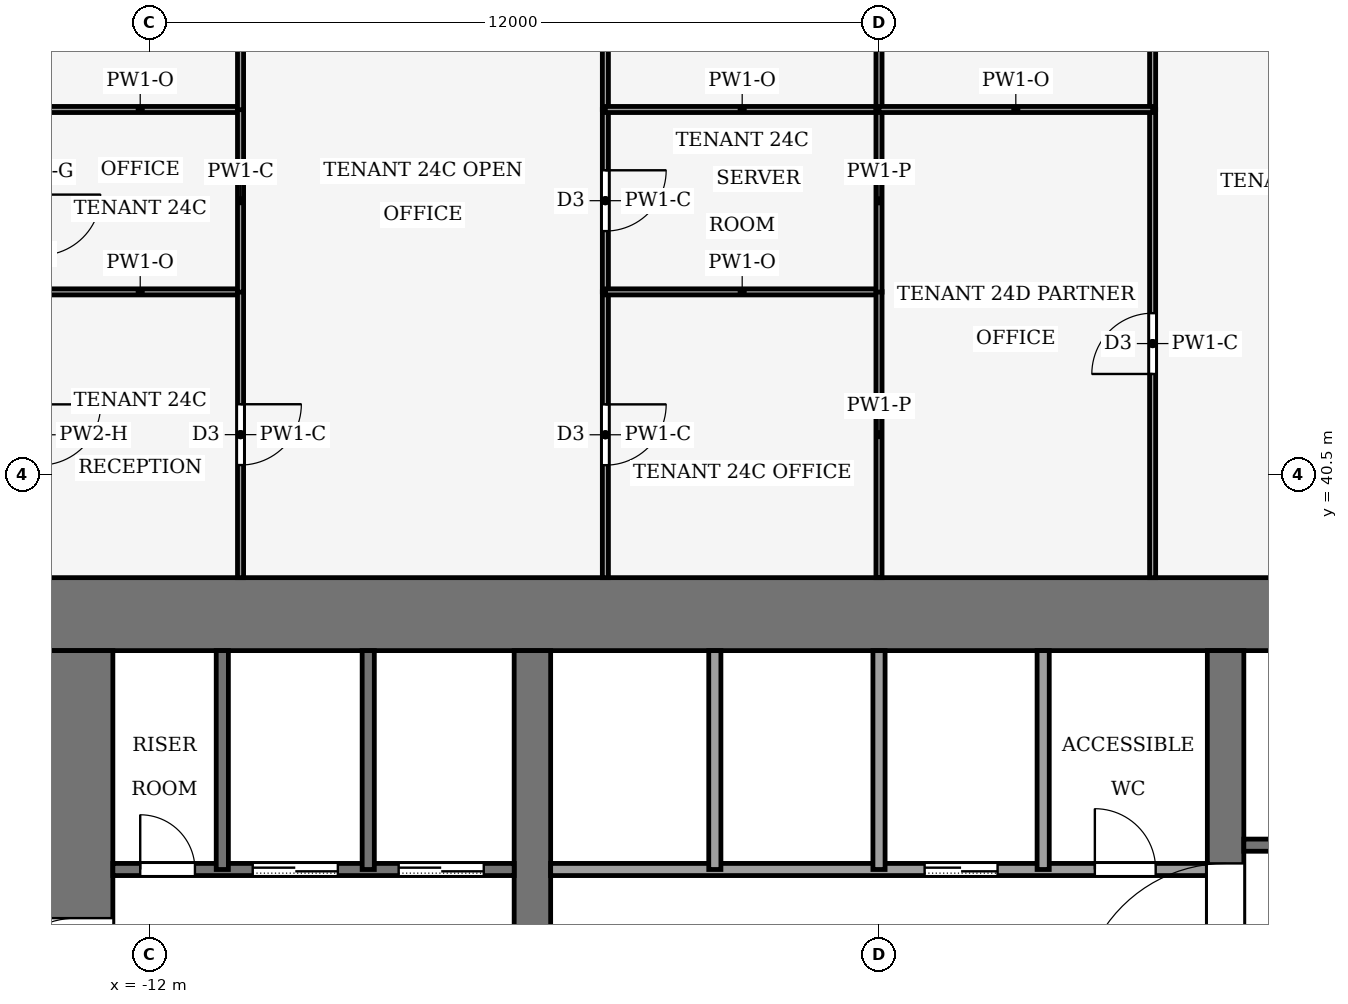
"""IFC4 building model, lengths in metres.
Left out: names, types, materials, properties, quantities, classifications, styles, units other than length and angle.
Written with IfcOpenShell. Run it as: python <this file> out.ifc"""

import sys

from ifc_helpers import new_model, si_unit, direction, frame, frame_2d, origin, place, context, subcontext, project, spatial, rectangle, extrude, element, fill, save


model = new_model("IFC4")
c1 = context("Model", 3, precision=1e-05, world=origin(), true_north=direction((0.0, 1.0)))
c2 = subcontext(c1, "Body", "Model", "MODEL_VIEW")
j1 = project(units=[si_unit("LENGTHUNIT", "METRE"), si_unit("PLANEANGLEUNIT", "RADIAN")], contexts=[c1])
p1 = place(None, origin())
s1 = spatial("IfcSite", under=j1, at=p1, CompositionType="ELEMENT")
p2 = place(p1, origin())
s2 = spatial("IfcBuilding", under=s1, at=p2, CompositionType="ELEMENT")
p3 = place(p2, frame((0.0, 0.0, 106.0)))
s3 = spatial("IfcBuildingStorey", under=s2, at=p3, CompositionType="ELEMENT", Elevation=106.0)
p4 = place(p3, frame((-13.8, 38.2, -0.13), z_axis=(0.0, 0.0, 1.0), x_axis=(1.0, 0.0, 0.0)))
e1 = element("IfcWall", 1, at=p4, inside=s3, PredefinedType="SHEAR", context=c2, shape_type="SweptSolid", body=[
    extrude(rectangle(XDim=27.6, YDim=1.2, at=frame_2d((13.8, 0.0))), origin(), (0.0, 0.0, 1.0), 4.0),
])
p5 = place(p3, frame((-13.2, 18.4, -0.13), z_axis=(0.0, 0.0, 1.0), x_axis=(0.0, 1.0, 0.0)))
e2 = element("IfcWall", 2, at=p5, inside=s3, PredefinedType="SHEAR", context=c2, shape_type="SweptSolid", body=[
    extrude(rectangle(XDim=19.2, YDim=1.2, at=frame_2d((9.6, 0.0))), origin(), (0.0, 0.0, 1.0), 4.0),
])
p6 = place(p5, frame((2.8, 0.0, 0.13)))
e3 = element("IfcOpeningElement", 3, at=p6, cuts=e2, PredefinedType="OPENING", context=c2, shape_type="SweptSolid", body=[
    extrude(rectangle(XDim=2.4, YDim=2.4, at=frame_2d((1.2, 1.2))), frame((0.0, 0.61, 0.0), z_axis=(0.0, -1.0, 0.0), x_axis=(1.0, 0.0, 0.0)), (0.0, 0.0, 1.0), 1.22),
])
p7 = place(p5, frame((13.4, 0.0, 0.13)))
e4 = element("IfcOpeningElement", 4, at=p7, cuts=e2, PredefinedType="OPENING", context=c2, shape_type="SweptSolid", body=[
    extrude(rectangle(XDim=1.4, YDim=2.2, at=frame_2d((0.7, 1.1))), frame((0.0, 0.61, 0.0), z_axis=(0.0, -1.0, 0.0), x_axis=(1.0, 0.0, 0.0)), (0.0, 0.0, 1.0), 1.22),
])
p8 = place(p3, frame((-5.7, 18.4, -0.13), z_axis=(0.0, 0.0, 1.0), x_axis=(0.0, 1.0, 0.0)))
e5 = element("IfcWall", 5, at=p8, inside=s3, PredefinedType="SHEAR", context=c2, shape_type="SweptSolid", body=[
    extrude(rectangle(XDim=19.2, YDim=0.6, at=frame_2d((9.6, 0.0))), origin(), (0.0, 0.0, 1.0), 4.0),
])
p9 = place(p8, frame((8.35, 0.0, 0.13)))
e6 = element("IfcOpeningElement", 6, at=p9, cuts=e5, PredefinedType="OPENING", context=c2, shape_type="SweptSolid", body=[
    extrude(rectangle(XDim=0.9, YDim=2.1, at=frame_2d((0.45, 1.05))), frame((0.0, 0.31, 0.0), z_axis=(0.0, -1.0, 0.0), x_axis=(1.0, 0.0, 0.0)), (0.0, 0.0, 1.0), 0.62),
])
p10 = place(p3, frame((5.7, 18.4, -0.13), z_axis=(0.0, 0.0, 1.0), x_axis=(0.0, 1.0, 0.0)))
e7 = element("IfcWall", 7, at=p10, inside=s3, PredefinedType="SHEAR", context=c2, shape_type="SweptSolid", body=[
    extrude(rectangle(XDim=19.2, YDim=0.6, at=frame_2d((9.6, 0.0))), origin(), (0.0, 0.0, 1.0), 4.0),
])
p11 = place(p10, frame((8.35, 0.0, 0.13)))
e8 = element("IfcOpeningElement", 8, at=p11, cuts=e7, PredefinedType="OPENING", context=c2, shape_type="SweptSolid", body=[
    extrude(rectangle(XDim=0.9, YDim=2.1, at=frame_2d((0.45, 1.05))), frame((0.0, 0.31, 0.0), z_axis=(0.0, -1.0, 0.0), x_axis=(1.0, 0.0, 0.0)), (0.0, 0.0, 1.0), 0.62),
])
p12 = place(p10, frame((13.3, 0.0, 0.13)))
e9 = element("IfcOpeningElement", 9, at=p12, cuts=e7, PredefinedType="OPENING", context=c2, shape_type="SweptSolid", body=[
    extrude(rectangle(XDim=2.4, YDim=2.4, at=frame_2d((1.2, 1.2))), frame((0.0, 0.31, 0.0), z_axis=(0.0, -1.0, 0.0), x_axis=(1.0, 0.0, 0.0)), (0.0, 0.0, 1.0), 0.62),
])
p13 = place(p3, frame((-12.6, 34.0, 0.0), z_axis=(0.0, 0.0, 1.0), x_axis=(1.0, 0.0, 0.0)))
e10 = element("IfcWall", 10, at=p13, inside=s3, PredefinedType="PARTITIONING", context=c2, shape_type="SweptSolid", body=[
    extrude(rectangle(XDim=6.6, YDim=0.2, at=frame_2d((3.3, 0.0))), origin(), (0.0, 0.0, 1.0), 3.87),
])
p14 = place(p13, frame((4.7, 0.0, 0.0)))
e11 = element("IfcOpeningElement", 11, at=p14, cuts=e10, PredefinedType="OPENING", context=c2, shape_type="SweptSolid", body=[
    extrude(rectangle(XDim=1.4, YDim=2.2, at=frame_2d((0.7, 1.1))), frame((0.0, 0.11, 0.0), z_axis=(0.0, -1.0, 0.0), x_axis=(1.0, 0.0, 0.0)), (0.0, 0.0, 1.0), 0.22),
])
p15 = place(p13, frame((2.3, 0.0, 0.0)))
e12 = element("IfcOpeningElement", 12, at=p15, cuts=e10, PredefinedType="OPENING", context=c2, shape_type="SweptSolid", body=[
    extrude(rectangle(XDim=1.4, YDim=2.2, at=frame_2d((0.7, 1.1))), frame((0.0, 0.11, 0.0), z_axis=(0.0, -1.0, 0.0), x_axis=(1.0, 0.0, 0.0)), (0.0, 0.0, 1.0), 0.22),
])
p16 = place(p13, frame((0.45, 0.0, 0.0)))
e13 = element("IfcOpeningElement", 13, at=p16, cuts=e10, PredefinedType="OPENING", context=c2, shape_type="SweptSolid", body=[
    extrude(rectangle(XDim=0.9, YDim=2.1, at=frame_2d((0.45, 1.05))), frame((0.0, 0.11, 0.0), z_axis=(0.0, -1.0, 0.0), x_axis=(1.0, 0.0, 0.0)), (0.0, 0.0, 1.0), 0.22),
])
p17 = place(p3, frame((-5.4, 34.0, 0.0), z_axis=(0.0, 0.0, 1.0), x_axis=(1.0, 0.0, 0.0)))
e14 = element("IfcWall", 14, at=p17, inside=s3, PredefinedType="PARTITIONING", context=c2, shape_type="SweptSolid", body=[
    extrude(rectangle(XDim=10.8, YDim=0.2, at=frame_2d((5.4, 0.0))), origin(), (0.0, 0.0, 1.0), 3.87),
])
p18 = place(p17, frame((6.15, 0.0, 0.0)))
e15 = element("IfcOpeningElement", 15, at=p18, cuts=e14, PredefinedType="OPENING", context=c2, shape_type="SweptSolid", body=[
    extrude(rectangle(XDim=1.2, YDim=2.2, at=frame_2d((0.6, 1.1))), frame((0.0, 0.11, 0.0), z_axis=(0.0, -1.0, 0.0), x_axis=(1.0, 0.0, 0.0)), (0.0, 0.0, 1.0), 0.22),
])
p19 = place(p17, frame((8.95, 0.0, 0.0)))
e16 = element("IfcOpeningElement", 16, at=p19, cuts=e14, PredefinedType="OPENING", context=c2, shape_type="SweptSolid", body=[
    extrude(rectangle(XDim=1.0, YDim=2.1, at=frame_2d((0.5, 1.05))), frame((0.0, 0.11, 0.0), z_axis=(0.0, -1.0, 0.0), x_axis=(1.0, 0.0, 0.0)), (0.0, 0.0, 1.0), 0.22),
])
p20 = place(p3, frame((6.0, 34.4, 0.0), z_axis=(0.0, 0.0, 1.0), x_axis=(1.0, 0.0, 0.0)))
e17 = element("IfcWall", 17, at=p20, inside=s3, PredefinedType="PARTITIONING", context=c2, shape_type="SweptSolid", body=[
    extrude(rectangle(XDim=6.6, YDim=0.2, at=frame_2d((3.3, 0.0))), origin(), (0.0, 0.0, 1.0), 3.87),
])
p21 = place(p20, frame((4.8, 0.0, 0.0)))
e18 = element("IfcOpeningElement", 18, at=p21, cuts=e17, PredefinedType="OPENING", context=c2, shape_type="SweptSolid", body=[
    extrude(rectangle(XDim=1.2, YDim=2.2, at=frame_2d((0.6, 1.1))), frame((0.0, 0.11, 0.0), z_axis=(0.0, -1.0, 0.0), x_axis=(1.0, 0.0, 0.0)), (0.0, 0.0, 1.0), 0.22),
])
for number, where, z_axis, x_axis in (
    (19, (-10.8, 34.0, 0.0), (0.0, 0.0, 1.0), (0.0, 1.0, 0.0)),
    (20, (-8.4, 34.0, 0.0), (0.0, 0.0, 1.0), (0.0, 1.0, 0.0)),
    (21, (-2.7, 34.0, 0.0), (0.0, 0.0, 1.0), (0.0, 1.0, 0.0)),
    (22, (0.0, 34.0, 0.0), (0.0, 0.0, 1.0), (0.0, 1.0, 0.0)),
    (23, (2.7, 34.0, 0.0), (0.0, 0.0, 1.0), (0.0, 1.0, 0.0)),
):
    element("IfcWall", number, at=place(p3, frame(where, z_axis=z_axis, x_axis=x_axis)), inside=s3, PredefinedType="PARTITIONING", context=c2, shape_type="SweptSolid", body=[
        extrude(rectangle(XDim=3.6, YDim=0.2, at=frame_2d((1.8, 0.0))), origin(), (0.0, 0.0, 1.0), 3.87),
    ])
p22 = place(p3, frame((-10.5, 43.5, 0.0), z_axis=(0.0, 0.0, 1.0), x_axis=(-1.0, 0.0, 0.0)))
e24 = element("IfcWall", 24, at=p22, inside=s3, PredefinedType="PARTITIONING", context=c2, shape_type="SweptSolid", body=[
    extrude(rectangle(XDim=3.3, YDim=0.1, at=frame_2d((1.65, 0.0))), origin(), (0.0, 0.0, 1.0), 3.39),
])
p23 = place(p3, frame((-10.5, 43.504, 0.0), z_axis=(0.0, 0.0, 1.0), x_axis=(0.0, -1.0, 0.0)))
e25 = element("IfcWall", 25, at=p23, inside=s3, PredefinedType="PARTITIONING", context=c2, shape_type="SweptSolid", body=[
    extrude(rectangle(XDim=4.704, YDim=0.1, at=frame_2d((2.352, 0.0))), origin(), (0.0, 0.0, 1.0), 3.87),
])
p24 = place(p23, frame((1.852, 0.0, 0.0)))
e26 = element("IfcOpeningElement", 26, at=p24, cuts=e25, PredefinedType="OPENING", context=c2, shape_type="SweptSolid", body=[
    extrude(rectangle(XDim=1.0, YDim=2.1, at=frame_2d((0.5, 1.05))), frame((0.0, 0.06, 0.0), z_axis=(0.0, -1.0, 0.0), x_axis=(1.0, 0.0, 0.0)), (0.0, 0.0, 1.0), 0.12),
])
p25 = place(p3, frame((-10.5, 46.5, 0.0), z_axis=(0.0, 0.0, 1.0), x_axis=(-1.0, 0.0, 0.0)))
e27 = element("IfcWall", 27, at=p25, inside=s3, PredefinedType="PARTITIONING", context=c2, shape_type="SweptSolid", body=[
    extrude(rectangle(XDim=3.3, YDim=0.1, at=frame_2d((1.65, 0.0))), origin(), (0.0, 0.0, 1.0), 3.39),
])
for number, where, z_axis, x_axis in (
    (28, (-10.5, 43.496, 0.0), (0.0, 0.0, 1.0), (0.0, 1.0, 0.0)),
    (29, (-10.5, 46.496, 0.0), (0.0, 0.0, 1.0), (0.0, 1.0, 0.0)),
):
    element("IfcWall", number, at=place(p3, frame(where, z_axis=z_axis, x_axis=x_axis)), inside=s3, PredefinedType="PARTITIONING", context=c2, shape_type="SweptSolid", body=[
        extrude(rectangle(XDim=3.008, YDim=0.1, at=frame_2d((1.504, 0.0))), origin(), (0.0, 0.0, 1.0), 3.87),
    ])
p26 = place(p3, frame((-4.5, 43.5, 0.0), z_axis=(0.0, 0.0, 1.0), x_axis=(0.0, -1.0, 0.0)))
e30 = element("IfcWall", 30, at=p26, inside=s3, PredefinedType="PARTITIONING", context=c2, shape_type="SweptSolid", body=[
    extrude(rectangle(XDim=4.7, YDim=0.1, at=frame_2d((2.35, 0.0))), origin(), (0.0, 0.0, 1.0), 3.87),
])
p27 = place(p26, frame((1.85, 0.0, 0.0)))
e31 = element("IfcOpeningElement", 31, at=p27, cuts=e30, PredefinedType="OPENING", context=c2, shape_type="SweptSolid", body=[
    extrude(rectangle(XDim=1.0, YDim=2.1, at=frame_2d((0.5, 1.05))), frame((0.0, 0.06, 0.0), z_axis=(0.0, -1.0, 0.0), x_axis=(1.0, 0.0, 0.0)), (0.0, 0.0, 1.0), 0.12),
])
p28 = place(p3, frame((-4.5, 46.5, 0.0), z_axis=(0.0, 0.0, 1.0), x_axis=(0.0, -1.0, 0.0)))
e32 = element("IfcWall", 32, at=p28, inside=s3, PredefinedType="PARTITIONING", context=c2, shape_type="SweptSolid", body=[
    extrude(rectangle(XDim=3.0, YDim=0.1, at=frame_2d((1.5, 0.0))), origin(), (0.0, 0.0, 1.0), 3.87),
])
p29 = place(p28, frame((1.0, 0.0, 0.0)))
e33 = element("IfcOpeningElement", 33, at=p29, cuts=e32, PredefinedType="OPENING", context=c2, shape_type="SweptSolid", body=[
    extrude(rectangle(XDim=1.0, YDim=2.1, at=frame_2d((0.5, 1.05))), frame((0.0, 0.06, 0.0), z_axis=(0.0, -1.0, 0.0), x_axis=(1.0, 0.0, 0.0)), (0.0, 0.0, 1.0), 0.12),
])
p30 = place(p3, frame((-4.5, 51.955, 0.0), z_axis=(0.0, 0.0, 1.0), x_axis=(0.0, -1.0, 0.0)))
e34 = element("IfcWall", 34, at=p30, inside=s3, PredefinedType="PARTITIONING", context=c2, shape_type="SweptSolid", body=[
    extrude(rectangle(XDim=5.455, YDim=0.1, at=frame_2d((2.728, 0.0))), origin(), (0.0, 0.0, 1.0), 3.04),
])
p31 = place(p30, frame((2.292, 0.0, 0.0)))
e35 = element("IfcOpeningElement", 35, at=p31, cuts=e34, PredefinedType="OPENING", context=c2, shape_type="SweptSolid", body=[
    extrude(rectangle(XDim=1.0, YDim=2.1, at=frame_2d((0.5, 1.05))), frame((0.0, 0.06, 0.0), z_axis=(0.0, -1.0, 0.0), x_axis=(1.0, 0.0, 0.0)), (0.0, 0.0, 1.0), 0.12),
])
p32 = place(p3, frame((0.0, 43.5, 0.0), z_axis=(0.0, 0.0, 1.0), x_axis=(-1.0, 0.0, 0.0)))
e36 = element("IfcWall", 36, at=p32, inside=s3, PredefinedType="PARTITIONING", context=c2, shape_type="SweptSolid", body=[
    extrude(rectangle(XDim=4.5, YDim=0.1, at=frame_2d((2.25, 0.0))), origin(), (0.0, 0.0, 1.0), 3.39),
])
p33 = place(p3, frame((0.0, 38.8, 0.0), z_axis=(0.0, 0.0, 1.0), x_axis=(0.0, 1.0, 0.0)))
e37 = element("IfcWall", 37, at=p33, inside=s3, PredefinedType="PARTITIONING", context=c2, shape_type="SweptSolid", body=[
    extrude(rectangle(XDim=4.704, YDim=0.1, at=frame_2d((2.352, 0.0))), origin(), (0.0, 0.0, 1.0), 3.44),
])
p34 = place(p3, frame((0.0, 46.5, 0.0), z_axis=(0.0, 0.0, 1.0), x_axis=(-1.0, 0.0, 0.0)))
e38 = element("IfcWall", 38, at=p34, inside=s3, PredefinedType="PARTITIONING", context=c2, shape_type="SweptSolid", body=[
    extrude(rectangle(XDim=4.5, YDim=0.1, at=frame_2d((2.25, 0.0))), origin(), (0.0, 0.0, 1.0), 3.39),
])
p35 = place(p3, frame((0.0, 43.496, 0.0), z_axis=(0.0, 0.0, 1.0), x_axis=(0.0, 1.0, 0.0)))
e39 = element("IfcWall", 39, at=p35, inside=s3, PredefinedType="PARTITIONING", context=c2, shape_type="SweptSolid", body=[
    extrude(rectangle(XDim=3.004, YDim=0.1, at=frame_2d((1.502, 0.0))), origin(), (0.0, 0.0, 1.0), 3.44),
])
p36 = place(p3, frame((0.0, 46.5, 0.0), z_axis=(0.0, 0.0, 1.0), x_axis=(0.0, 1.0, 0.0)))
e40 = element("IfcWall", 40, at=p36, inside=s3, PredefinedType="PARTITIONING", context=c2, shape_type="SweptSolid", body=[
    extrude(rectangle(XDim=5.08, YDim=0.1, at=frame_2d((2.54, 0.0))), origin(), (0.0, 0.0, 1.0), 3.04),
])
p37 = place(p3, frame((4.5, 38.8, 0.0), z_axis=(0.0, 0.0, 1.0), x_axis=(0.0, 1.0, 0.0)))
e41 = element("IfcWall", 41, at=p37, inside=s3, PredefinedType="PARTITIONING", context=c2, shape_type="SweptSolid", body=[
    extrude(rectangle(XDim=7.7, YDim=0.1, at=frame_2d((3.85, 0.0))), origin(), (0.0, 0.0, 1.0), 3.87),
])
p38 = place(p37, frame((3.35, 0.0, 0.0)))
e42 = element("IfcOpeningElement", 42, at=p38, cuts=e41, PredefinedType="OPENING", context=c2, shape_type="SweptSolid", body=[
    extrude(rectangle(XDim=1.0, YDim=2.1, at=frame_2d((0.5, 1.05))), frame((0.0, 0.06, 0.0), z_axis=(0.0, -1.0, 0.0), x_axis=(1.0, 0.0, 0.0)), (0.0, 0.0, 1.0), 0.12),
])
p39 = place(p3, frame((4.5, 46.5, 0.0), z_axis=(0.0, 0.0, 1.0), x_axis=(0.0, 1.0, 0.0)))
e43 = element("IfcWall", 43, at=p39, inside=s3, PredefinedType="PARTITIONING", context=c2, shape_type="SweptSolid", body=[
    extrude(rectangle(XDim=5.455, YDim=0.1, at=frame_2d((2.728, 0.0))), origin(), (0.0, 0.0, 1.0), 3.04),
])
p40 = place(p39, frame((2.162, 0.0, 0.0)))
e44 = element("IfcOpeningElement", 44, at=p40, cuts=e43, PredefinedType="OPENING", context=c2, shape_type="SweptSolid", body=[
    extrude(rectangle(XDim=1.0, YDim=2.1, at=frame_2d((0.5, 1.05))), frame((0.0, 0.06, 0.0), z_axis=(0.0, -1.0, 0.0), x_axis=(1.0, 0.0, 0.0)), (0.0, 0.0, 1.0), 0.12),
])
p41 = place(p3, frame((4.5, 46.5, 0.0), z_axis=(0.0, 0.0, 1.0), x_axis=(-1.0, 0.0, 0.0)))
e45 = element("IfcWall", 45, at=p41, inside=s3, PredefinedType="PARTITIONING", context=c2, shape_type="SweptSolid", body=[
    extrude(rectangle(XDim=4.5, YDim=0.1, at=frame_2d((2.25, 0.0))), origin(), (0.0, 0.0, 1.0), 3.39),
])
p42 = place(p18, origin())
e46 = element("IfcDoor", 46, at=p42, inside=s3, OperationType="SLIDING_TO_LEFT", PredefinedType="DOOR", context=c2, shape_type="SweptSolid", body=[
    extrude(rectangle(XDim=1.2, YDim=2.2, at=frame_2d((0.6, 1.1))), frame((0.0, 0.025, 0.0), z_axis=(0.0, -1.0, 0.0), x_axis=(1.0, 0.0, 0.0)), (0.0, 0.0, 1.0), 0.05),
])
fill(e15, e46)
p43 = place(p14, origin())
e47 = element("IfcDoor", 47, at=p43, inside=s3, OperationType="SLIDING_TO_LEFT", PredefinedType="DOOR", context=c2, shape_type="SweptSolid", body=[
    extrude(rectangle(XDim=1.4, YDim=2.2, at=frame_2d((0.7, 1.1))), frame((0.0, 0.025, 0.0), z_axis=(0.0, -1.0, 0.0), x_axis=(1.0, 0.0, 0.0)), (0.0, 0.0, 1.0), 0.05),
])
fill(e11, e47)
p44 = place(p15, origin())
e48 = element("IfcDoor", 48, at=p44, inside=s3, OperationType="SLIDING_TO_LEFT", PredefinedType="DOOR", context=c2, shape_type="SweptSolid", body=[
    extrude(rectangle(XDim=1.4, YDim=2.2, at=frame_2d((0.7, 1.1))), frame((0.0, 0.025, 0.0), z_axis=(0.0, -1.0, 0.0), x_axis=(1.0, 0.0, 0.0)), (0.0, 0.0, 1.0), 0.05),
])
fill(e12, e48)
p45 = place(p16, origin())
e49 = element("IfcDoor", 49, at=p45, inside=s3, OperationType="SINGLE_SWING_RIGHT", PredefinedType="DOOR", context=c2, shape_type="SweptSolid", body=[
    extrude(rectangle(XDim=0.9, YDim=2.1, at=frame_2d((0.45, 1.05))), frame((0.0, 0.025, 0.0), z_axis=(0.0, -1.0, 0.0), x_axis=(1.0, 0.0, 0.0)), (0.0, 0.0, 1.0), 0.05),
])
fill(e13, e49)
p46 = place(p19, origin())
e50 = element("IfcDoor", 50, at=p46, inside=s3, OperationType="SINGLE_SWING_LEFT", PredefinedType="DOOR", context=c2, shape_type="SweptSolid", body=[
    extrude(rectangle(XDim=1.0, YDim=2.1, at=frame_2d((0.5, 1.05))), frame((0.0, 0.025, 0.0), z_axis=(0.0, -1.0, 0.0), x_axis=(1.0, 0.0, 0.0)), (0.0, 0.0, 1.0), 0.05),
])
fill(e16, e50)
p47 = place(p12, origin())
e51 = element("IfcDoor", 51, at=p47, inside=s3, OperationType="DOUBLE_DOOR_SINGLE_SWING", PredefinedType="DOOR", context=c2, shape_type="SweptSolid", body=[
    extrude(rectangle(XDim=2.4, YDim=2.4, at=frame_2d((1.2, 1.2))), frame((0.0, 0.025, 0.0), z_axis=(0.0, -1.0, 0.0), x_axis=(1.0, 0.0, 0.0)), (0.0, 0.0, 1.0), 0.05),
])
fill(e9, e51)
p48 = place(p7, origin())
e52 = element("IfcDoor", 52, at=p48, inside=s3, OperationType="SINGLE_SWING_RIGHT", PredefinedType="DOOR", context=c2, shape_type="SweptSolid", body=[
    extrude(rectangle(XDim=1.4, YDim=2.2, at=frame_2d((0.7, 1.1))), frame((0.0, 0.025, 0.0), z_axis=(0.0, -1.0, 0.0), x_axis=(1.0, 0.0, 0.0)), (0.0, 0.0, 1.0), 0.05),
])
fill(e4, e52)
p49 = place(p24, origin())
e53 = element("IfcDoor", 53, at=p49, inside=s3, OperationType="SINGLE_SWING_RIGHT", PredefinedType="DOOR", context=c2, shape_type="SweptSolid", body=[
    extrude(rectangle(XDim=1.0, YDim=2.1, at=frame_2d((0.5, 1.05))), frame((0.0, 0.025, 0.0), z_axis=(0.0, -1.0, 0.0), x_axis=(1.0, 0.0, 0.0)), (0.0, 0.0, 1.0), 0.05),
])
fill(e26, e53)
p50 = place(p27, origin())
e54 = element("IfcDoor", 54, at=p50, inside=s3, OperationType="SINGLE_SWING_LEFT", PredefinedType="DOOR", context=c2, shape_type="SweptSolid", body=[
    extrude(rectangle(XDim=1.0, YDim=2.1, at=frame_2d((0.5, 1.05))), frame((0.0, 0.025, 0.0), z_axis=(0.0, -1.0, 0.0), x_axis=(1.0, 0.0, 0.0)), (0.0, 0.0, 1.0), 0.05),
])
fill(e31, e54)
p51 = place(p29, origin())
e55 = element("IfcDoor", 55, at=p51, inside=s3, OperationType="SINGLE_SWING_RIGHT", PredefinedType="DOOR", context=c2, shape_type="SweptSolid", body=[
    extrude(rectangle(XDim=1.0, YDim=2.1, at=frame_2d((0.5, 1.05))), frame((0.0, 0.025, 0.0), z_axis=(0.0, -1.0, 0.0), x_axis=(1.0, 0.0, 0.0)), (0.0, 0.0, 1.0), 0.05),
])
fill(e33, e55)
p52 = place(p38, origin())
e56 = element("IfcDoor", 56, at=p52, inside=s3, OperationType="SINGLE_SWING_LEFT", PredefinedType="DOOR", context=c2, shape_type="SweptSolid", body=[
    extrude(rectangle(XDim=1.0, YDim=2.1, at=frame_2d((0.5, 1.05))), frame((0.0, 0.025, 0.0), z_axis=(0.0, -1.0, 0.0), x_axis=(1.0, 0.0, 0.0)), (0.0, 0.0, 1.0), 0.05),
])
fill(e42, e56)
save(model, sys.argv[1])
